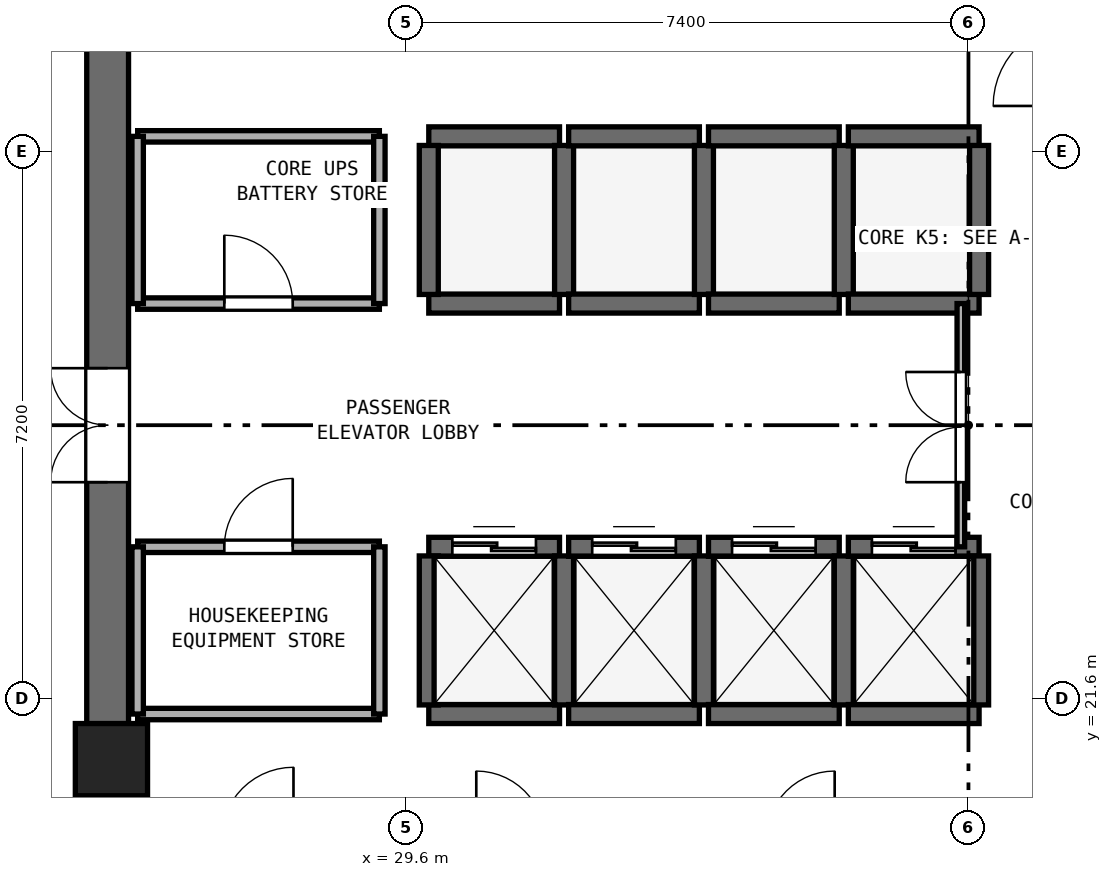
"""IFC4 building model, lengths in metres.
Left out: names, types, materials, properties, quantities, classifications, styles, units other than length and angle.
Written with IfcOpenShell. Run it as: python <this file> out.ifc"""

import sys

from ifc_helpers import new_model, si_unit, direction, frame, frame_2d, origin, origin_2d, place, context, subcontext, project, spatial, rectangle, extrude, element, fill, save


model = new_model("IFC4")
c1 = context("Model", 3, precision=1e-05, world=origin(), true_north=direction((0.0, 1.0)))
c2 = subcontext(c1, "Body", "Model", "MODEL_VIEW")
j1 = project(units=[si_unit("LENGTHUNIT", "METRE"), si_unit("PLANEANGLEUNIT", "RADIAN")], contexts=[c1])
p1 = place(None, origin())
s1 = spatial("IfcSite", under=j1, at=p1, CompositionType="ELEMENT")
p2 = place(p1, origin())
s2 = spatial("IfcBuilding", under=s1, at=p2, CompositionType="ELEMENT")
p3 = place(p2, frame((0.0, 0.0, 147.8)))
s3 = spatial("IfcBuildingStorey", under=s2, at=p3, CompositionType="ELEMENT", Elevation=147.8)
p4 = place(p3, frame((25.675, 17.55, 0.0), z_axis=(0.0, 0.0, 1.0), x_axis=(0.0, 1.0, 0.0)))
e1 = element("IfcWall", 1, at=p4, inside=s3, PredefinedType="SHEAR", context=c2, shape_type="SweptSolid", body=[
    extrude(rectangle(XDim=15.3, YDim=0.55, at=frame_2d((7.65, 0.0))), origin(), (0.0, 0.0, 1.0), 3.54),
])
p5 = place(p4, frame((6.9, 0.0, 0.0)))
e2 = element("IfcOpeningElement", 2, at=p5, cuts=e1, PredefinedType="OPENING", context=c2, shape_type="SweptSolid", body=[
    extrude(rectangle(XDim=1.5, YDim=2.15, at=frame_2d((0.75, 1.075))), frame((0.0, 0.285, 0.0), z_axis=(0.0, -1.0, 0.0), x_axis=(1.0, 0.0, 0.0)), (0.0, 0.0, 1.0), 0.57),
])
p6 = place(p3, frame((25.725, 20.8, 0.0), z_axis=(0.0, 0.0, 1.0), x_axis=(1.0, 0.0, 0.0)))
e3 = element("IfcColumn", 3, at=p6, inside=s3, PredefinedType="PILASTER", context=c2, shape_type="SweptSolid", body=[
    extrude(rectangle(XDim=0.95, YDim=0.95, at=origin_2d()), origin(), (0.0, 0.0, 1.0), 3.8),
])
p7 = place(p3, frame((29.9, 21.4, 0.0), z_axis=(0.0, 0.0, 1.0), x_axis=(1.0, 0.0, 0.0)))
e4 = element("IfcWall", 4, at=p7, inside=s3, PredefinedType="SHEAR", context=c2, shape_type="SweptSolid", body=[
    extrude(rectangle(XDim=1.72, YDim=0.25, at=frame_2d((0.86, 0.0))), origin(), (0.0, 0.0, 1.0), 3.54),
])
p8 = place(p3, frame((29.9, 23.6, 0.0), z_axis=(0.0, 0.0, 1.0), x_axis=(1.0, 0.0, 0.0)))
e5 = element("IfcWall", 5, at=p8, inside=s3, PredefinedType="SHEAR", context=c2, shape_type="SweptSolid", body=[
    extrude(rectangle(XDim=1.72, YDim=0.25, at=frame_2d((0.86, 0.0))), origin(), (0.0, 0.0, 1.0), 3.54),
])
p9 = place(p8, frame((0.31, 0.0, 0.0)))
e6 = element("IfcOpeningElement", 6, at=p9, cuts=e5, PredefinedType="OPENING", context=c2, shape_type="SweptSolid", body=[
    extrude(rectangle(XDim=1.1, YDim=2.15, at=frame_2d((0.55, 1.075))), frame((0.0, 0.135, 0.0), z_axis=(0.0, -1.0, 0.0), x_axis=(1.0, 0.0, 0.0)), (0.0, 0.0, 1.0), 0.27),
])
for number, where, z_axis, x_axis in (
    (7, (29.9, 21.52, 0.0), (0.0, 0.0, 1.0), (0.0, 1.0, 0.0)),
    (8, (31.68, 21.52, 0.0), (0.0, 0.0, 1.0), (0.0, 1.0, 0.0)),
):
    element("IfcWall", number, at=place(p3, frame(where, z_axis=z_axis, x_axis=x_axis)), inside=s3, PredefinedType="SHEAR", context=c2, shape_type="SweptSolid", body=[
        extrude(rectangle(XDim=1.96, YDim=0.25, at=frame_2d((0.98, 0.0))), origin(), (0.0, 0.0, 1.0), 3.54),
    ])
p10 = place(p3, frame((31.74, 21.4, 0.0), z_axis=(0.0, 0.0, 1.0), x_axis=(1.0, 0.0, 0.0)))
e9 = element("IfcWall", 9, at=p10, inside=s3, PredefinedType="SHEAR", context=c2, shape_type="SweptSolid", body=[
    extrude(rectangle(XDim=1.72, YDim=0.25, at=frame_2d((0.86, 0.0))), origin(), (0.0, 0.0, 1.0), 3.54),
])
p11 = place(p3, frame((31.74, 23.6, 0.0), z_axis=(0.0, 0.0, 1.0), x_axis=(1.0, 0.0, 0.0)))
e10 = element("IfcWall", 10, at=p11, inside=s3, PredefinedType="SHEAR", context=c2, shape_type="SweptSolid", body=[
    extrude(rectangle(XDim=1.72, YDim=0.25, at=frame_2d((0.86, 0.0))), origin(), (0.0, 0.0, 1.0), 3.54),
])
p12 = place(p11, frame((0.31, 0.0, 0.0)))
e11 = element("IfcOpeningElement", 11, at=p12, cuts=e10, PredefinedType="OPENING", context=c2, shape_type="SweptSolid", body=[
    extrude(rectangle(XDim=1.1, YDim=2.15, at=frame_2d((0.55, 1.075))), frame((0.0, 0.135, 0.0), z_axis=(0.0, -1.0, 0.0), x_axis=(1.0, 0.0, 0.0)), (0.0, 0.0, 1.0), 0.27),
])
p13 = place(p3, frame((33.52, 21.52, 0.0), z_axis=(0.0, 0.0, 1.0), x_axis=(0.0, 1.0, 0.0)))
e12 = element("IfcWall", 12, at=p13, inside=s3, PredefinedType="SHEAR", context=c2, shape_type="SweptSolid", body=[
    extrude(rectangle(XDim=1.96, YDim=0.25, at=frame_2d((0.98, 0.0))), origin(), (0.0, 0.0, 1.0), 3.54),
])
p14 = place(p3, frame((33.58, 21.4, 0.0), z_axis=(0.0, 0.0, 1.0), x_axis=(1.0, 0.0, 0.0)))
e13 = element("IfcWall", 13, at=p14, inside=s3, PredefinedType="SHEAR", context=c2, shape_type="SweptSolid", body=[
    extrude(rectangle(XDim=1.72, YDim=0.25, at=frame_2d((0.86, 0.0))), origin(), (0.0, 0.0, 1.0), 3.54),
])
p15 = place(p3, frame((33.58, 23.6, 0.0), z_axis=(0.0, 0.0, 1.0), x_axis=(1.0, 0.0, 0.0)))
e14 = element("IfcWall", 14, at=p15, inside=s3, PredefinedType="SHEAR", context=c2, shape_type="SweptSolid", body=[
    extrude(rectangle(XDim=1.72, YDim=0.25, at=frame_2d((0.86, 0.0))), origin(), (0.0, 0.0, 1.0), 3.54),
])
p16 = place(p15, frame((0.31, 0.0, 0.0)))
e15 = element("IfcOpeningElement", 15, at=p16, cuts=e14, PredefinedType="OPENING", context=c2, shape_type="SweptSolid", body=[
    extrude(rectangle(XDim=1.1, YDim=2.15, at=frame_2d((0.55, 1.075))), frame((0.0, 0.135, 0.0), z_axis=(0.0, -1.0, 0.0), x_axis=(1.0, 0.0, 0.0)), (0.0, 0.0, 1.0), 0.27),
])
p17 = place(p3, frame((35.36, 21.52, 0.0), z_axis=(0.0, 0.0, 1.0), x_axis=(0.0, 1.0, 0.0)))
e16 = element("IfcWall", 16, at=p17, inside=s3, PredefinedType="SHEAR", context=c2, shape_type="SweptSolid", body=[
    extrude(rectangle(XDim=1.96, YDim=0.25, at=frame_2d((0.98, 0.0))), origin(), (0.0, 0.0, 1.0), 3.54),
])
p18 = place(p3, frame((35.42, 21.4, 0.0), z_axis=(0.0, 0.0, 1.0), x_axis=(1.0, 0.0, 0.0)))
e17 = element("IfcWall", 17, at=p18, inside=s3, PredefinedType="SHEAR", context=c2, shape_type="SweptSolid", body=[
    extrude(rectangle(XDim=1.72, YDim=0.25, at=frame_2d((0.86, 0.0))), origin(), (0.0, 0.0, 1.0), 3.54),
])
p19 = place(p3, frame((35.42, 23.6, 0.0), z_axis=(0.0, 0.0, 1.0), x_axis=(1.0, 0.0, 0.0)))
e18 = element("IfcWall", 18, at=p19, inside=s3, PredefinedType="SHEAR", context=c2, shape_type="SweptSolid", body=[
    extrude(rectangle(XDim=1.72, YDim=0.25, at=frame_2d((0.86, 0.0))), origin(), (0.0, 0.0, 1.0), 3.54),
])
p20 = place(p19, frame((0.31, 0.0, 0.0)))
e19 = element("IfcOpeningElement", 19, at=p20, cuts=e18, PredefinedType="OPENING", context=c2, shape_type="SweptSolid", body=[
    extrude(rectangle(XDim=1.1, YDim=2.15, at=frame_2d((0.55, 1.075))), frame((0.0, 0.135, 0.0), z_axis=(0.0, -1.0, 0.0), x_axis=(1.0, 0.0, 0.0)), (0.0, 0.0, 1.0), 0.27),
])
p21 = place(p3, frame((37.14, 21.52, 0.0), z_axis=(0.0, 0.0, 1.0), x_axis=(0.0, 1.0, 0.0)))
e20 = element("IfcWall", 20, at=p21, inside=s3, PredefinedType="SHEAR", context=c2, shape_type="SweptSolid", body=[
    extrude(rectangle(XDim=1.96, YDim=0.25, at=frame_2d((0.98, 0.0))), origin(), (0.0, 0.0, 1.0), 3.54),
])
for number, where, z_axis, x_axis in (
    (21, (29.9, 26.8, 0.0), (0.0, 0.0, 1.0), (1.0, 0.0, 0.0)),
    (22, (29.9, 29.0, 0.0), (0.0, 0.0, 1.0), (1.0, 0.0, 0.0)),
):
    element("IfcWall", number, at=place(p3, frame(where, z_axis=z_axis, x_axis=x_axis)), inside=s3, PredefinedType="SHEAR", context=c2, shape_type="SweptSolid", body=[
        extrude(rectangle(XDim=1.72, YDim=0.25, at=frame_2d((0.86, 0.0))), origin(), (0.0, 0.0, 1.0), 3.54),
    ])
for number, where, z_axis, x_axis in (
    (23, (29.9, 26.92, 0.0), (0.0, 0.0, 1.0), (0.0, 1.0, 0.0)),
    (24, (31.68, 26.92, 0.0), (0.0, 0.0, 1.0), (0.0, 1.0, 0.0)),
):
    element("IfcWall", number, at=place(p3, frame(where, z_axis=z_axis, x_axis=x_axis)), inside=s3, PredefinedType="SHEAR", context=c2, shape_type="SweptSolid", body=[
        extrude(rectangle(XDim=1.96, YDim=0.25, at=frame_2d((0.98, 0.0))), origin(), (0.0, 0.0, 1.0), 3.54),
    ])
for number, where, z_axis, x_axis in (
    (25, (31.74, 26.8, 0.0), (0.0, 0.0, 1.0), (1.0, 0.0, 0.0)),
    (26, (31.74, 29.0, 0.0), (0.0, 0.0, 1.0), (1.0, 0.0, 0.0)),
):
    element("IfcWall", number, at=place(p3, frame(where, z_axis=z_axis, x_axis=x_axis)), inside=s3, PredefinedType="SHEAR", context=c2, shape_type="SweptSolid", body=[
        extrude(rectangle(XDim=1.72, YDim=0.25, at=frame_2d((0.86, 0.0))), origin(), (0.0, 0.0, 1.0), 3.54),
    ])
p22 = place(p3, frame((33.52, 26.92, 0.0), z_axis=(0.0, 0.0, 1.0), x_axis=(0.0, 1.0, 0.0)))
e27 = element("IfcWall", 27, at=p22, inside=s3, PredefinedType="SHEAR", context=c2, shape_type="SweptSolid", body=[
    extrude(rectangle(XDim=1.96, YDim=0.25, at=frame_2d((0.98, 0.0))), origin(), (0.0, 0.0, 1.0), 3.54),
])
for number, where, z_axis, x_axis in (
    (28, (33.58, 26.8, 0.0), (0.0, 0.0, 1.0), (1.0, 0.0, 0.0)),
    (29, (33.58, 29.0, 0.0), (0.0, 0.0, 1.0), (1.0, 0.0, 0.0)),
):
    element("IfcWall", number, at=place(p3, frame(where, z_axis=z_axis, x_axis=x_axis)), inside=s3, PredefinedType="SHEAR", context=c2, shape_type="SweptSolid", body=[
        extrude(rectangle(XDim=1.72, YDim=0.25, at=frame_2d((0.86, 0.0))), origin(), (0.0, 0.0, 1.0), 3.54),
    ])
p23 = place(p3, frame((35.36, 26.92, 0.0), z_axis=(0.0, 0.0, 1.0), x_axis=(0.0, 1.0, 0.0)))
e30 = element("IfcWall", 30, at=p23, inside=s3, PredefinedType="SHEAR", context=c2, shape_type="SweptSolid", body=[
    extrude(rectangle(XDim=1.96, YDim=0.25, at=frame_2d((0.98, 0.0))), origin(), (0.0, 0.0, 1.0), 3.54),
])
for number, where, z_axis, x_axis in (
    (31, (35.42, 26.8, 0.0), (0.0, 0.0, 1.0), (1.0, 0.0, 0.0)),
    (32, (35.42, 29.0, 0.0), (0.0, 0.0, 1.0), (1.0, 0.0, 0.0)),
):
    element("IfcWall", number, at=place(p3, frame(where, z_axis=z_axis, x_axis=x_axis)), inside=s3, PredefinedType="SHEAR", context=c2, shape_type="SweptSolid", body=[
        extrude(rectangle(XDim=1.72, YDim=0.25, at=frame_2d((0.86, 0.0))), origin(), (0.0, 0.0, 1.0), 3.54),
    ])
p24 = place(p3, frame((37.14, 26.92, 0.0), z_axis=(0.0, 0.0, 1.0), x_axis=(0.0, 1.0, 0.0)))
e33 = element("IfcWall", 33, at=p24, inside=s3, PredefinedType="SHEAR", context=c2, shape_type="SweptSolid", body=[
    extrude(rectangle(XDim=1.96, YDim=0.25, at=frame_2d((0.98, 0.0))), origin(), (0.0, 0.0, 1.0), 3.54),
])
p25 = place(p3, frame((26.07, 26.8, 0.0), z_axis=(0.0, 0.0, 1.0), x_axis=(1.0, 0.0, 0.0)))
e34 = element("IfcWall", 34, at=p25, inside=s3, PredefinedType="PARTITIONING", context=c2, shape_type="SweptSolid", body=[
    extrude(rectangle(XDim=3.18, YDim=0.15, at=frame_2d((1.59, 0.0))), origin(), (0.0, 0.0, 1.0), 3.54),
])
p26 = place(p25, frame((1.14, 0.0, 0.0)))
e35 = element("IfcOpeningElement", 35, at=p26, cuts=e34, PredefinedType="OPENING", context=c2, shape_type="SweptSolid", body=[
    extrude(rectangle(XDim=0.9, YDim=2.1, at=frame_2d((0.45, 1.05))), frame((0.0, 0.085, 0.0), z_axis=(0.0, -1.0, 0.0), x_axis=(1.0, 0.0, 0.0)), (0.0, 0.0, 1.0), 0.17),
])
p27 = place(p3, frame((26.07, 29.0, 0.0), z_axis=(0.0, 0.0, 1.0), x_axis=(1.0, 0.0, 0.0)))
e36 = element("IfcWall", 36, at=p27, inside=s3, PredefinedType="PARTITIONING", context=c2, shape_type="SweptSolid", body=[
    extrude(rectangle(XDim=3.18, YDim=0.15, at=frame_2d((1.59, 0.0))), origin(), (0.0, 0.0, 1.0), 3.54),
])
p28 = place(p3, frame((26.07, 26.8, 0.0), z_axis=(0.0, 0.0, 1.0), x_axis=(0.0, 1.0, 0.0)))
e37 = element("IfcWall", 37, at=p28, inside=s3, PredefinedType="PARTITIONING", context=c2, shape_type="SweptSolid", body=[
    extrude(rectangle(XDim=2.2, YDim=0.15, at=frame_2d((1.1, 0.0))), origin(), (0.0, 0.0, 1.0), 2.64),
])
p29 = place(p3, frame((29.25, 26.8, 0.0), z_axis=(0.0, 0.0, 1.0), x_axis=(0.0, 1.0, 0.0)))
e38 = element("IfcWall", 38, at=p29, inside=s3, PredefinedType="PARTITIONING", context=c2, shape_type="SweptSolid", body=[
    extrude(rectangle(XDim=2.2, YDim=0.15, at=frame_2d((1.1, 0.0))), origin(), (0.0, 0.0, 1.0), 3.54),
])
p30 = place(p3, frame((26.07, 21.4, 0.0), z_axis=(0.0, 0.0, 1.0), x_axis=(1.0, 0.0, 0.0)))
e39 = element("IfcWall", 39, at=p30, inside=s3, PredefinedType="PARTITIONING", context=c2, shape_type="SweptSolid", body=[
    extrude(rectangle(XDim=3.18, YDim=0.15, at=frame_2d((1.59, 0.0))), origin(), (0.0, 0.0, 1.0), 3.54),
])
p31 = place(p3, frame((26.07, 23.6, 0.0), z_axis=(0.0, 0.0, 1.0), x_axis=(1.0, 0.0, 0.0)))
e40 = element("IfcWall", 40, at=p31, inside=s3, PredefinedType="PARTITIONING", context=c2, shape_type="SweptSolid", body=[
    extrude(rectangle(XDim=3.18, YDim=0.15, at=frame_2d((1.59, 0.0))), origin(), (0.0, 0.0, 1.0), 3.54),
])
p32 = place(p31, frame((1.14, 0.0, 0.0)))
e41 = element("IfcOpeningElement", 41, at=p32, cuts=e40, PredefinedType="OPENING", context=c2, shape_type="SweptSolid", body=[
    extrude(rectangle(XDim=0.9, YDim=2.1, at=frame_2d((0.45, 1.05))), frame((0.0, 0.085, 0.0), z_axis=(0.0, -1.0, 0.0), x_axis=(1.0, 0.0, 0.0)), (0.0, 0.0, 1.0), 0.17),
])
p33 = place(p3, frame((26.07, 21.4, 0.0), z_axis=(0.0, 0.0, 1.0), x_axis=(0.0, 1.0, 0.0)))
e42 = element("IfcWall", 42, at=p33, inside=s3, PredefinedType="PARTITIONING", context=c2, shape_type="SweptSolid", body=[
    extrude(rectangle(XDim=2.2, YDim=0.15, at=frame_2d((1.1, 0.0))), origin(), (0.0, 0.0, 1.0), 2.64),
])
p34 = place(p3, frame((29.25, 21.4, 0.0), z_axis=(0.0, 0.0, 1.0), x_axis=(0.0, 1.0, 0.0)))
e43 = element("IfcWall", 43, at=p34, inside=s3, PredefinedType="PARTITIONING", context=c2, shape_type="SweptSolid", body=[
    extrude(rectangle(XDim=2.2, YDim=0.15, at=frame_2d((1.1, 0.0))), origin(), (0.0, 0.0, 1.0), 3.54),
])
p35 = place(p3, frame((36.9, 23.6, 0.0), z_axis=(0.0, 0.0, 1.0), x_axis=(0.0, 1.0, 0.0)))
e44 = element("IfcWall", 44, at=p35, inside=s3, PredefinedType="PARTITIONING", context=c2, shape_type="SweptSolid", body=[
    extrude(rectangle(XDim=3.2, YDim=0.1, at=frame_2d((1.6, 0.0))), origin(), (0.0, 0.0, 1.0), 3.54),
])
p36 = place(p35, frame((0.85, 0.0, 0.0)))
e45 = element("IfcOpeningElement", 45, at=p36, cuts=e44, PredefinedType="OPENING", context=c2, shape_type="SweptSolid", body=[
    extrude(rectangle(XDim=1.45, YDim=2.12, at=frame_2d((0.725, 1.06))), frame((0.0, 0.06, 0.0), z_axis=(0.0, -1.0, 0.0), x_axis=(1.0, 0.0, 0.0)), (0.0, 0.0, 1.0), 0.12),
])
p37 = place(p9, origin())
e46 = element("IfcDoor", 46, at=p37, inside=s3, OperationType="DOUBLE_DOOR_SLIDING", PredefinedType="DOOR", context=c2, shape_type="SweptSolid", body=[
    extrude(rectangle(XDim=1.1, YDim=2.15, at=frame_2d((0.55, 1.075))), frame((0.0, 0.025, 0.0), z_axis=(0.0, -1.0, 0.0), x_axis=(1.0, 0.0, 0.0)), (0.0, 0.0, 1.0), 0.05),
])
fill(e6, e46)
p38 = place(p12, origin())
e47 = element("IfcDoor", 47, at=p38, inside=s3, OperationType="DOUBLE_DOOR_SLIDING", PredefinedType="DOOR", context=c2, shape_type="SweptSolid", body=[
    extrude(rectangle(XDim=1.1, YDim=2.15, at=frame_2d((0.55, 1.075))), frame((0.0, 0.025, 0.0), z_axis=(0.0, -1.0, 0.0), x_axis=(1.0, 0.0, 0.0)), (0.0, 0.0, 1.0), 0.05),
])
fill(e11, e47)
p39 = place(p16, origin())
e48 = element("IfcDoor", 48, at=p39, inside=s3, OperationType="DOUBLE_DOOR_SLIDING", PredefinedType="DOOR", context=c2, shape_type="SweptSolid", body=[
    extrude(rectangle(XDim=1.1, YDim=2.15, at=frame_2d((0.55, 1.075))), frame((0.0, 0.025, 0.0), z_axis=(0.0, -1.0, 0.0), x_axis=(1.0, 0.0, 0.0)), (0.0, 0.0, 1.0), 0.05),
])
fill(e15, e48)
p40 = place(p20, origin())
e49 = element("IfcDoor", 49, at=p40, inside=s3, OperationType="DOUBLE_DOOR_SLIDING", PredefinedType="DOOR", context=c2, shape_type="SweptSolid", body=[
    extrude(rectangle(XDim=1.1, YDim=2.15, at=frame_2d((0.55, 1.075))), frame((0.0, 0.025, 0.0), z_axis=(0.0, -1.0, 0.0), x_axis=(1.0, 0.0, 0.0)), (0.0, 0.0, 1.0), 0.05),
])
fill(e19, e49)
p41 = place(p5, origin())
e50 = element("IfcDoor", 50, at=p41, inside=s3, OperationType="DOUBLE_DOOR_SINGLE_SWING", PredefinedType="DOOR", context=c2, shape_type="SweptSolid", body=[
    extrude(rectangle(XDim=1.5, YDim=2.15, at=frame_2d((0.75, 1.075))), frame((0.0, 0.025, 0.0), z_axis=(0.0, -1.0, 0.0), x_axis=(1.0, 0.0, 0.0)), (0.0, 0.0, 1.0), 0.05),
])
fill(e2, e50)
p42 = place(p26, origin())
e51 = element("IfcDoor", 51, at=p42, inside=s3, OperationType="SINGLE_SWING_LEFT", PredefinedType="DOOR", context=c2, shape_type="SweptSolid", body=[
    extrude(rectangle(XDim=0.9, YDim=2.1, at=frame_2d((0.45, 1.05))), frame((0.0, 0.025, 0.0), z_axis=(0.0, -1.0, 0.0), x_axis=(1.0, 0.0, 0.0)), (0.0, 0.0, 1.0), 0.05),
])
fill(e35, e51)
p43 = place(p32, origin())
e52 = element("IfcDoor", 52, at=p43, inside=s3, OperationType="SINGLE_SWING_RIGHT", PredefinedType="DOOR", context=c2, shape_type="SweptSolid", body=[
    extrude(rectangle(XDim=0.9, YDim=2.1, at=frame_2d((0.45, 1.05))), frame((0.0, 0.025, 0.0), z_axis=(0.0, -1.0, 0.0), x_axis=(1.0, 0.0, 0.0)), (0.0, 0.0, 1.0), 0.05),
])
fill(e41, e52)
p44 = place(p36, origin())
e53 = element("IfcDoor", 53, at=p44, inside=s3, OperationType="DOUBLE_DOOR_SINGLE_SWING", PredefinedType="DOOR", context=c2, shape_type="SweptSolid", body=[
    extrude(rectangle(XDim=1.45, YDim=2.12, at=frame_2d((0.725, 1.06))), frame((0.0, 0.025, 0.0), z_axis=(0.0, -1.0, 0.0), x_axis=(1.0, 0.0, 0.0)), (0.0, 0.0, 1.0), 0.05),
])
fill(e45, e53)
save(model, sys.argv[1])
